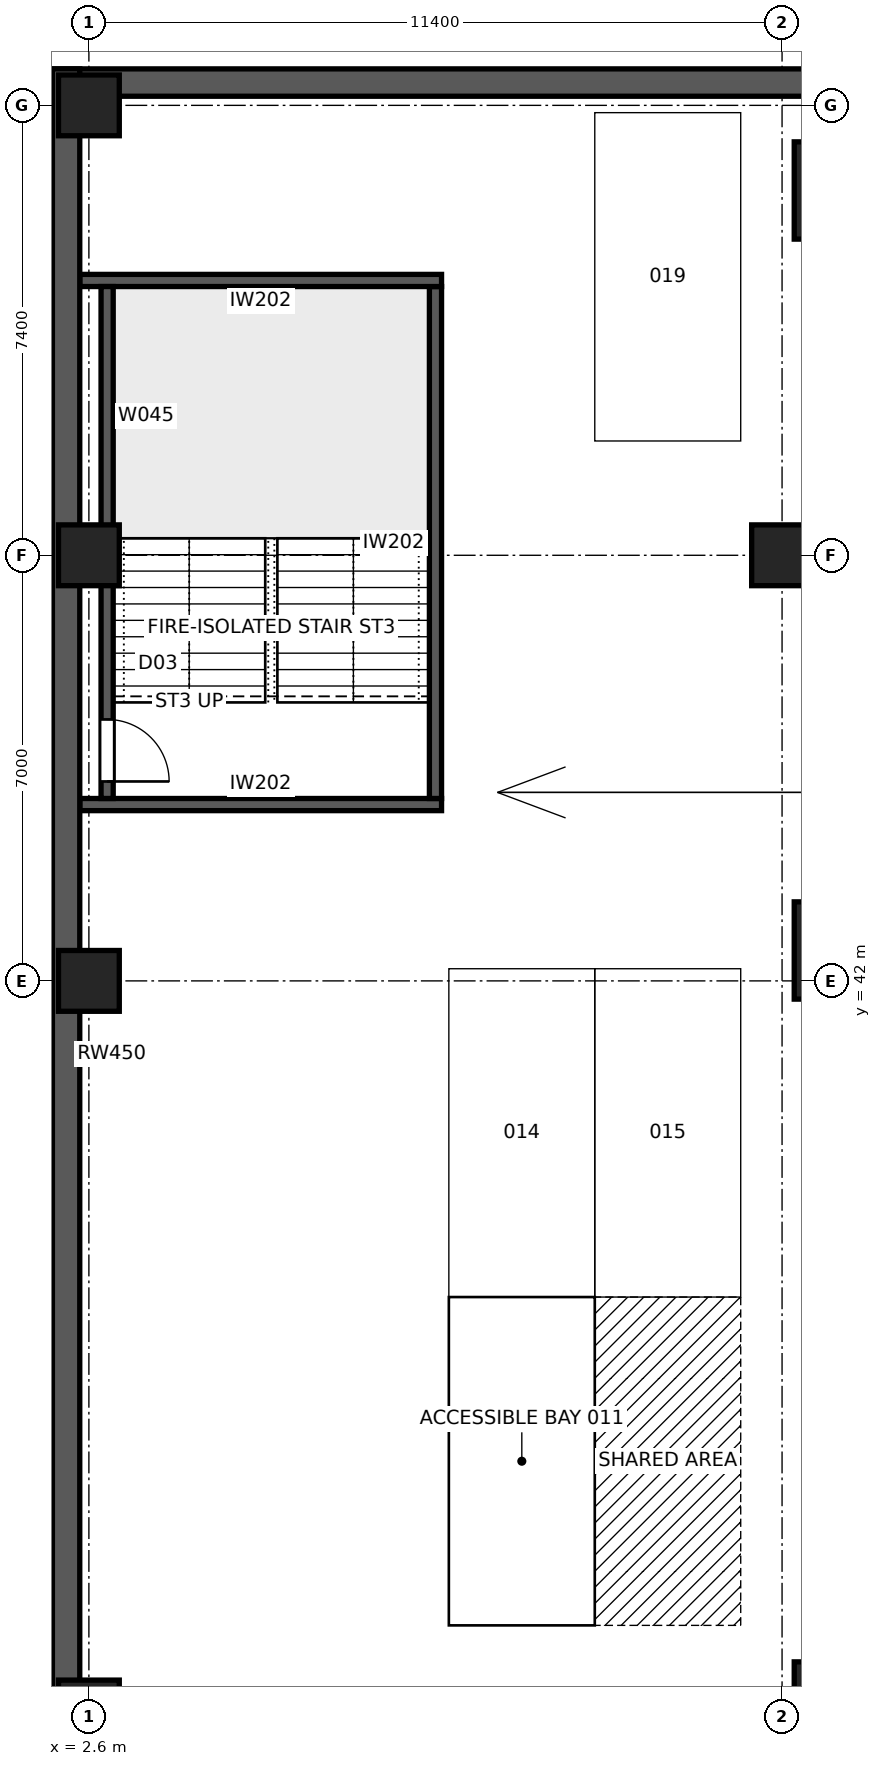
"""IFC4 building model, lengths in metres.
Left out: names, types, materials, properties, quantities, classifications, styles, units other than length and angle.
Written with IfcOpenShell. Run it as: python <this file> out.ifc"""

import sys

from ifc_helpers import new_model, si_unit, direction, frame, frame_2d, origin, origin_2d, place, context, subcontext, project, spatial, rectangle, extrude, element, fill, save


model = new_model("IFC4")
c1 = context("Model", 3, precision=1e-05, world=origin(), true_north=direction((0.0, 1.0)))
c2 = subcontext(c1, "Body", "Model", "MODEL_VIEW")
j1 = project(units=[si_unit("LENGTHUNIT", "METRE"), si_unit("PLANEANGLEUNIT", "RADIAN")], contexts=[c1])
p1 = place(None, origin())
s1 = spatial("IfcSite", under=j1, at=p1, CompositionType="ELEMENT")
p2 = place(p1, origin())
s2 = spatial("IfcBuilding", under=s1, at=p2, CompositionType="ELEMENT")
p3 = place(p2, frame((0.0, 0.0, -3.7)))
s3 = spatial("IfcBuildingStorey", under=s2, at=p3, CompositionType="ELEMENT", Elevation=-3.7)
for number, where, z_axis, x_axis in (
    (1, (15.0, 55.0, 0.0), (0.0, 0.0, 1.0), (1.0, 0.0, 0.0)),
    (2, (15.0, 42.5, 0.0), (0.0, 0.0, 1.0), (1.0, 0.0, 0.0)),
    (3, (15.0, 30.0, 0.0), (0.0, 0.0, 1.0), (1.0, 0.0, 0.0)),
):
    element("IfcColumn", number, at=place(p3, frame(where, z_axis=z_axis, x_axis=x_axis)), inside=s3, PredefinedType="COLUMN", context=c2, shape_type="SweptSolid", body=[
        extrude(rectangle(XDim=1.6, YDim=1.6, at=origin_2d()), origin(), (0.0, 0.0, 1.0), 3.7),
    ])
for number, where, z_axis, x_axis in (
    (4, (2.6, 30.0, 0.0), (0.0, 0.0, 1.0), (1.0, 0.0, 0.0)),
    (5, (2.6, 42.0, 0.0), (0.0, 0.0, 1.0), (1.0, 0.0, 0.0)),
    (6, (2.6, 49.0, 0.0), (0.0, 0.0, 1.0), (1.0, 0.0, 0.0)),
    (7, (2.6, 56.4, 0.0), (0.0, 0.0, 1.0), (1.0, 0.0, 0.0)),
    (8, (14.0, 49.0, 0.0), (0.0, 0.0, 1.0), (1.0, 0.0, 0.0)),
):
    element("IfcColumn", number, at=place(p3, frame(where, z_axis=z_axis, x_axis=x_axis)), inside=s3, PredefinedType="COLUMN", context=c2, shape_type="SweptSolid", body=[
        extrude(rectangle(XDim=1.0, YDim=1.0, at=origin_2d()), origin(), (0.0, 0.0, 1.0), 3.7),
    ])
p4 = place(p3, frame((78.0, 56.775, 0.0), z_axis=(0.0, 0.0, 1.0), x_axis=(-1.0, 0.0, 0.0)))
e9 = element("IfcWall", 9, at=p4, inside=s3, PredefinedType="SHEAR", context=c2, shape_type="SweptSolid", body=[
    extrude(rectangle(XDim=76.0, YDim=0.45, at=frame_2d((38.0, 0.0))), origin(), (0.0, 0.0, 1.0), 3.7),
])
p5 = place(p3, frame((2.225, 57.0, 0.0), z_axis=(0.0, 0.0, 1.0), x_axis=(0.0, -1.0, 0.0)))
e10 = element("IfcWall", 10, at=p5, inside=s3, PredefinedType="SHEAR", context=c2, shape_type="SweptSolid", body=[
    extrude(rectangle(XDim=54.0, YDim=0.45, at=frame_2d((27.0, 0.0))), origin(), (0.0, 0.0, 1.0), 3.7),
])
p6 = place(p3, frame((2.45, 44.9, 0.0), z_axis=(0.0, 0.0, 1.0), x_axis=(1.0, 0.0, 0.0)))
e11 = element("IfcWall", 11, at=p6, inside=s3, PredefinedType="SOLIDWALL", context=c2, shape_type="SweptSolid", body=[
    extrude(rectangle(XDim=5.95, YDim=0.2, at=frame_2d((2.975, 0.0))), origin(), (0.0, 0.0, 1.0), 3.35),
])
p7 = place(p3, frame((8.3, 45.0, 0.0), z_axis=(0.0, 0.0, 1.0), x_axis=(0.0, 1.0, 0.0)))
e12 = element("IfcWall", 12, at=p7, inside=s3, PredefinedType="SOLIDWALL", context=c2, shape_type="SweptSolid", body=[
    extrude(rectangle(XDim=8.42, YDim=0.2, at=frame_2d((4.21, 0.0))), origin(), (0.0, 0.0, 1.0), 3.35),
])
p8 = place(p3, frame((8.4, 53.52, 0.0), z_axis=(0.0, 0.0, 1.0), x_axis=(-1.0, 0.0, 0.0)))
e13 = element("IfcWall", 13, at=p8, inside=s3, PredefinedType="SOLIDWALL", context=c2, shape_type="SweptSolid", body=[
    extrude(rectangle(XDim=5.95, YDim=0.2, at=frame_2d((2.975, 0.0))), origin(), (0.0, 0.0, 1.0), 3.35),
])
p9 = place(p3, frame((2.9, 53.42, 0.0), z_axis=(0.0, 0.0, 1.0), x_axis=(0.0, -1.0, 0.0)))
e14 = element("IfcWall", 14, at=p9, inside=s3, PredefinedType="SOLIDWALL", context=c2, shape_type="SweptSolid", body=[
    extrude(rectangle(XDim=8.42, YDim=0.2, at=frame_2d((4.21, 0.0))), origin(), (0.0, 0.0, 1.0), 3.35),
])
p10 = place(p9, frame((7.12, 0.0, 0.0)))
e15 = element("IfcOpeningElement", 15, at=p10, cuts=e14, PredefinedType="OPENING", context=c2, shape_type="SweptSolid", body=[
    extrude(rectangle(XDim=1.02, YDim=2.1, at=frame_2d((0.51, 1.05))), frame((0.0, 0.11, 0.0), z_axis=(0.0, -1.0, 0.0), x_axis=(1.0, 0.0, 0.0)), (0.0, 0.0, 1.0), 0.22),
])
p11 = place(p10, origin())
e16 = element("IfcDoor", 16, at=p11, inside=s3, OperationType="SINGLE_SWING_RIGHT", PredefinedType="DOOR", context=c2, shape_type="SweptSolid", body=[
    extrude(rectangle(XDim=1.02, YDim=2.1, at=frame_2d((0.51, 1.05))), frame((0.0, 0.025, 0.0), z_axis=(0.0, -1.0, 0.0), x_axis=(1.0, 0.0, 0.0)), (0.0, 0.0, 1.0), 0.05),
])
fill(e15, e16)
save(model, sys.argv[1])
